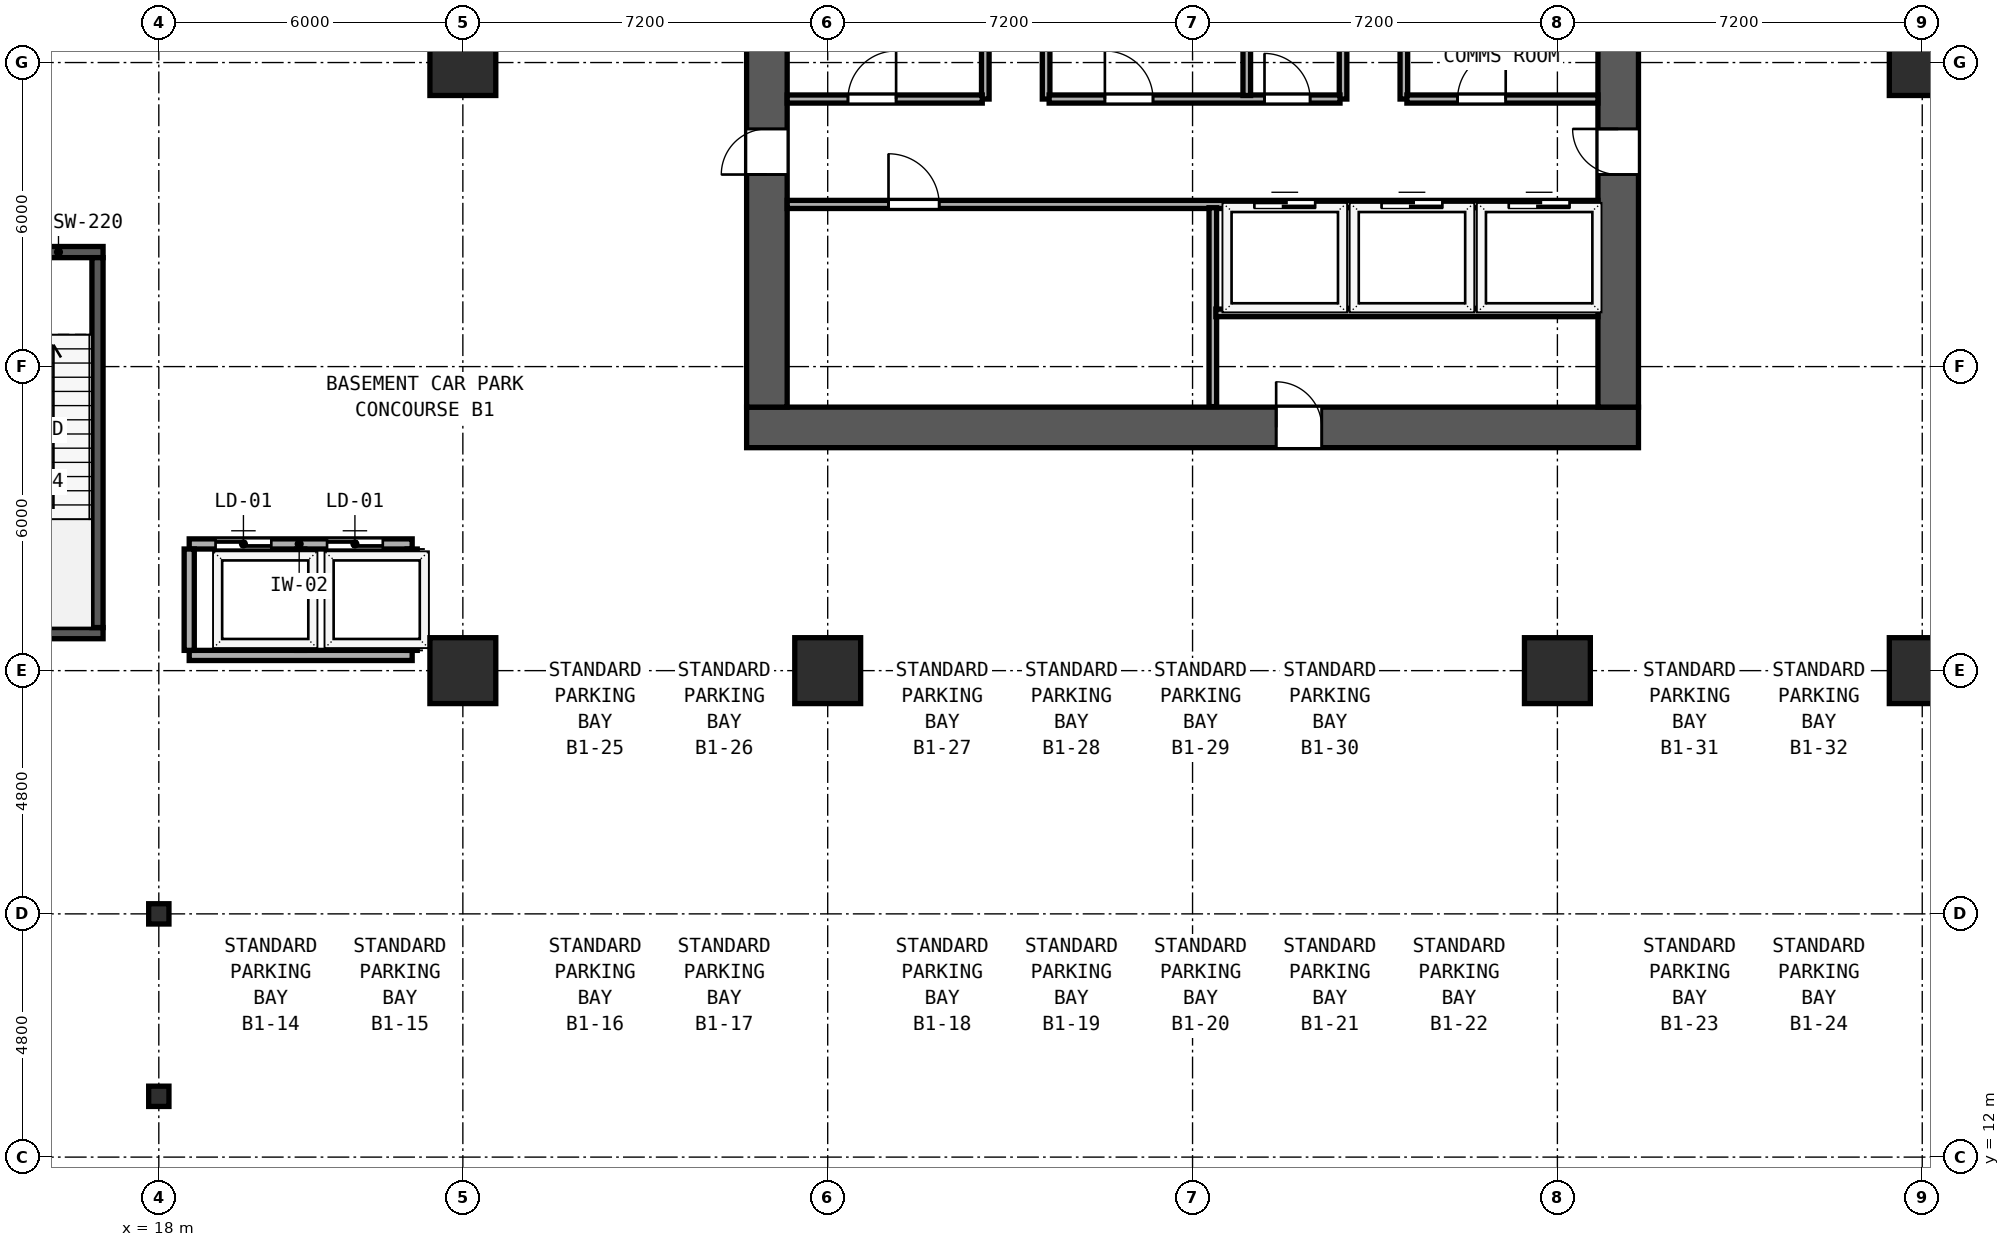
"""IFC4 building model, lengths in metres.
Left out: names, types, materials, properties, quantities, classifications, styles, units other than length and angle.
Written with IfcOpenShell. Run it as: python <this file> out.ifc"""

import sys

from ifc_helpers import new_model, si_unit, direction, frame, frame_2d, origin, origin_2d, place, context, subcontext, project, spatial, rectangle, hollow_rectangle, i_section, extrude, element, fill, save


model = new_model("IFC4")
c1 = context("Model", 3, precision=1e-05, world=origin(), true_north=direction((0.0, 1.0)))
c2 = subcontext(c1, "Body", "Model", "MODEL_VIEW")
j1 = project(units=[si_unit("LENGTHUNIT", "METRE"), si_unit("PLANEANGLEUNIT", "RADIAN")], contexts=[c1])
p1 = place(None, origin())
s1 = spatial("IfcSite", under=j1, at=p1, CompositionType="ELEMENT")
p2 = place(p1, origin())
s2 = spatial("IfcBuilding", under=s1, at=p2, CompositionType="ELEMENT")
p3 = place(p2, frame((0.0, 0.0, -4.8)))
s3 = spatial("IfcBuildingStorey", under=s2, at=p3, CompositionType="ELEMENT", Elevation=-4.8)
p4 = place(p3, frame((29.6, 26.4, 0.0), z_axis=(0.0, 0.0, 1.0), x_axis=(1.0, 0.0, 0.0)))
e1 = element("IfcWall", 1, at=p4, inside=s3, PredefinedType="SHEAR", context=c2, shape_type="SweptSolid", body=[
    extrude(rectangle(XDim=17.6, YDim=0.8, at=frame_2d((8.8, 0.0))), origin(), (0.0, 0.0, 1.0), 4.5),
])
p5 = place(p4, frame((11.35, 0.0, 0.0), z_axis=(0.0, 0.0, 1.0), x_axis=(-1.0, 0.0, 0.0)))
e2 = element("IfcOpeningElement", 2, at=p5, cuts=e1, PredefinedType="OPENING", context=c2, shape_type="SweptSolid", body=[
    extrude(rectangle(XDim=0.9, YDim=2.1, at=frame_2d((0.45, 1.05))), frame((0.0, 0.41, 0.0), z_axis=(0.0, -1.0, 0.0), x_axis=(1.0, 0.0, 0.0)), (0.0, 0.0, 1.0), 0.82),
])
p6 = place(p3, frame((30.0, 26.8, 0.0), z_axis=(0.0, 0.0, 1.0), x_axis=(0.0, 1.0, 0.0)))
e3 = element("IfcWall", 3, at=p6, inside=s3, PredefinedType="SHEAR", context=c2, shape_type="SweptSolid", body=[
    extrude(rectangle(XDim=16.0, YDim=0.8, at=frame_2d((8.0, 0.0))), origin(), (0.0, 0.0, 1.0), 4.5),
])
p7 = place(p6, frame((4.59, 0.0, 0.0)))
e4 = element("IfcOpeningElement", 4, at=p7, cuts=e3, PredefinedType="OPENING", context=c2, shape_type="SweptSolid", body=[
    extrude(rectangle(XDim=0.9, YDim=2.1, at=frame_2d((0.45, 1.05))), frame((0.0, 0.41, 0.0), z_axis=(0.0, -1.0, 0.0), x_axis=(1.0, 0.0, 0.0)), (0.0, 0.0, 1.0), 0.82),
])
p8 = place(p3, frame((46.8, 26.8, 0.0), z_axis=(0.0, 0.0, 1.0), x_axis=(0.0, 1.0, 0.0)))
e5 = element("IfcWall", 5, at=p8, inside=s3, PredefinedType="SHEAR", context=c2, shape_type="SweptSolid", body=[
    extrude(rectangle(XDim=16.0, YDim=0.8, at=frame_2d((8.0, 0.0))), origin(), (0.0, 0.0, 1.0), 4.5),
])
p9 = place(p8, frame((5.49, 0.0, 0.0), z_axis=(0.0, 0.0, 1.0), x_axis=(-1.0, 0.0, 0.0)))
e6 = element("IfcOpeningElement", 6, at=p9, cuts=e5, PredefinedType="OPENING", context=c2, shape_type="SweptSolid", body=[
    extrude(rectangle(XDim=0.9, YDim=2.1, at=frame_2d((0.45, 1.05))), frame((0.0, 0.41, 0.0), z_axis=(0.0, -1.0, 0.0), x_axis=(1.0, 0.0, 0.0)), (0.0, 0.0, 1.0), 0.82),
])
p10 = place(p3, frame((13.28, 29.86, 0.0), z_axis=(0.0, 0.0, 1.0), x_axis=(1.0, 0.0, 0.0)))
e7 = element("IfcWall", 7, at=p10, inside=s3, PredefinedType="SHEAR", context=c2, shape_type="SweptSolid", body=[
    extrude(rectangle(XDim=3.62, YDim=0.22, at=frame_2d((1.81, 0.0))), origin(), (0.0, 0.0, 1.0), 4.5),
])
p11 = place(p10, frame((1.05, 0.0, 0.0)))
e8 = element("IfcOpeningElement", 8, at=p11, cuts=e7, PredefinedType="OPENING", context=c2, shape_type="SweptSolid", body=[
    extrude(rectangle(XDim=1.1, YDim=2.15, at=frame_2d((0.55, 1.075))), frame((0.0, 0.12, 0.0), z_axis=(0.0, -1.0, 0.0), x_axis=(1.0, 0.0, 0.0)), (0.0, 0.0, 1.0), 0.24),
])
p12 = place(p3, frame((13.28, 22.34, 0.0), z_axis=(0.0, 0.0, 1.0), x_axis=(1.0, 0.0, 0.0)))
e9 = element("IfcWall", 9, at=p12, inside=s3, PredefinedType="SHEAR", context=c2, shape_type="SweptSolid", body=[
    extrude(rectangle(XDim=3.62, YDim=0.22, at=frame_2d((1.81, 0.0))), origin(), (0.0, 0.0, 1.0), 4.5),
])
p13 = place(p3, frame((16.79, 22.45, 0.0), z_axis=(0.0, 0.0, 1.0), x_axis=(0.0, 1.0, 0.0)))
e10 = element("IfcWall", 10, at=p13, inside=s3, PredefinedType="SHEAR", context=c2, shape_type="SweptSolid", body=[
    extrude(rectangle(XDim=7.3, YDim=0.22, at=frame_2d((3.65, 0.0))), origin(), (0.0, 0.0, 1.0), 4.5),
])
for number, where, z_axis, x_axis in (
    (11, (24.0, 21.6, 0.0), (0.0, 0.0, 1.0), (1.0, 0.0, 0.0)),
    (12, (24.0, 33.6, 0.0), (0.0, 0.0, 1.0), (1.0, 0.0, 0.0)),
    (13, (52.8, 21.6, 0.0), (0.0, 0.0, 1.0), (1.0, 0.0, 0.0)),
    (14, (52.8, 33.6, 0.0), (0.0, 0.0, 1.0), (1.0, 0.0, 0.0)),
    (15, (31.2, 21.6, 0.0), (0.0, 0.0, 1.0), (1.0, 0.0, 0.0)),
    (16, (45.6, 21.6, 0.0), (0.0, 0.0, 1.0), (1.0, 0.0, 0.0)),
):
    element("IfcColumn", number, at=place(p3, frame(where, z_axis=z_axis, x_axis=x_axis)), inside=s3, PredefinedType="COLUMN", context=c2, shape_type="SweptSolid", body=[
        extrude(hollow_rectangle(XDim=1.3, YDim=1.3, WallThickness=0.048, at=origin_2d()), origin(), (0.0, 0.0, 1.0), 4.8),
    ])
for number, where, z_axis, x_axis in (
    (17, (18.0, 13.2, 0.0), (0.0, 0.0, 1.0), (1.0, 0.0, 0.0)),
    (18, (18.0, 16.8, 0.0), (0.0, 0.0, 1.0), (1.0, 0.0, 0.0)),
):
    element("IfcColumn", number, at=place(p3, frame(where, z_axis=z_axis, x_axis=x_axis)), inside=s3, PredefinedType="COLUMN", context=c2, shape_type="SweptSolid", body=[
        extrude(i_section(OverallWidth=0.4, OverallDepth=0.4, WebThickness=0.013, FlangeThickness=0.021, FilletRadius=0.022, at=origin_2d()), origin(), (0.0, 0.0, 1.0), 4.8),
    ])
for number, where, z_axis, x_axis in (
    (19, (34.31, 32.88, 0.0), (0.0, 0.0, 1.0), (0.0, 1.0, 0.0)),
    (20, (35.51, 32.88, 0.0), (0.0, 0.0, 1.0), (0.0, 1.0, 0.0)),
    (21, (41.37, 32.88, 0.0), (0.0, 0.0, 1.0), (0.0, 1.0, 0.0)),
    (22, (42.57, 32.88, 0.0), (0.0, 0.0, 1.0), (0.0, 1.0, 0.0)),
):
    element("IfcWall", number, at=place(p3, frame(where, z_axis=z_axis, x_axis=x_axis)), inside=s3, PredefinedType="SOLIDWALL", context=c2, shape_type="SweptSolid", body=[
        extrude(rectangle(XDim=2.17, YDim=0.15, at=frame_2d((1.085, 0.0))), origin(), (0.0, 0.0, 1.0), 4.5),
    ])
p14 = place(p3, frame((30.4, 32.88, 0.0), z_axis=(0.0, 0.0, 1.0), x_axis=(1.0, 0.0, 0.0)))
e23 = element("IfcWall", 23, at=p14, inside=s3, PredefinedType="SOLIDWALL", context=c2, shape_type="SweptSolid", body=[
    extrude(rectangle(XDim=3.85, YDim=0.16, at=frame_2d((1.925, 0.0))), origin(), (0.0, 0.0, 1.0), 4.5),
])
p15 = place(p14, frame((2.15, 0.0, 0.0), z_axis=(0.0, 0.0, 1.0), x_axis=(-1.0, 0.0, 0.0)))
e24 = element("IfcOpeningElement", 24, at=p15, cuts=e23, PredefinedType="OPENING", context=c2, shape_type="SweptSolid", body=[
    extrude(rectangle(XDim=0.95, YDim=2.12, at=frame_2d((0.475, 1.06))), frame((0.0, 0.09, 0.0), z_axis=(0.0, -1.0, 0.0), x_axis=(1.0, 0.0, 0.0)), (0.0, 0.0, 1.0), 0.18),
])
p16 = place(p3, frame((35.57, 32.88, 0.0), z_axis=(0.0, 0.0, 1.0), x_axis=(1.0, 0.0, 0.0)))
e25 = element("IfcWall", 25, at=p16, inside=s3, PredefinedType="SOLIDWALL", context=c2, shape_type="SweptSolid", body=[
    extrude(rectangle(XDim=5.74, YDim=0.16, at=frame_2d((2.87, 0.0))), origin(), (0.0, 0.0, 1.0), 4.5),
])
p17 = place(p16, frame((2.05, 0.0, 0.0), z_axis=(0.0, 0.0, 1.0), x_axis=(-1.0, 0.0, 0.0)))
e26 = element("IfcOpeningElement", 26, at=p17, cuts=e25, PredefinedType="OPENING", context=c2, shape_type="SweptSolid", body=[
    extrude(rectangle(XDim=0.95, YDim=2.12, at=frame_2d((0.475, 1.06))), frame((0.0, 0.09, 0.0), z_axis=(0.0, -1.0, 0.0), x_axis=(1.0, 0.0, 0.0)), (0.0, 0.0, 1.0), 0.18),
])
p18 = place(p16, frame((5.15, 0.0, 0.0), z_axis=(0.0, 0.0, 1.0), x_axis=(-1.0, 0.0, 0.0)))
e27 = element("IfcOpeningElement", 27, at=p18, cuts=e25, PredefinedType="OPENING", context=c2, shape_type="SweptSolid", body=[
    extrude(rectangle(XDim=0.9, YDim=2.1, at=frame_2d((0.45, 1.05))), frame((0.0, 0.09, 0.0), z_axis=(0.0, -1.0, 0.0), x_axis=(1.0, 0.0, 0.0)), (0.0, 0.0, 1.0), 0.18),
])
p19 = place(p3, frame((42.63, 32.88, 0.0), z_axis=(0.0, 0.0, 1.0), x_axis=(1.0, 0.0, 0.0)))
e28 = element("IfcWall", 28, at=p19, inside=s3, PredefinedType="SOLIDWALL", context=c2, shape_type="SweptSolid", body=[
    extrude(rectangle(XDim=3.77, YDim=0.16, at=frame_2d((1.885, 0.0))), origin(), (0.0, 0.0, 1.0), 4.5),
])
p20 = place(p19, frame((1.95, 0.0, 0.0), z_axis=(0.0, 0.0, 1.0), x_axis=(-1.0, 0.0, 0.0)))
e29 = element("IfcOpeningElement", 29, at=p20, cuts=e28, PredefinedType="OPENING", context=c2, shape_type="SweptSolid", body=[
    extrude(rectangle(XDim=0.95, YDim=2.12, at=frame_2d((0.475, 1.06))), frame((0.0, 0.09, 0.0), z_axis=(0.0, -1.0, 0.0), x_axis=(1.0, 0.0, 0.0)), (0.0, 0.0, 1.0), 0.18),
])
p21 = place(p3, frame((39.47, 32.95, 0.0), z_axis=(0.0, 0.0, 1.0), x_axis=(0.0, 1.0, 0.0)))
e30 = element("IfcWall", 30, at=p21, inside=s3, PredefinedType="SOLIDWALL", context=c2, shape_type="SweptSolid", body=[
    extrude(rectangle(XDim=2.05, YDim=0.15, at=frame_2d((1.025, 0.0))), origin(), (0.0, 0.0, 1.0), 4.5),
])
p22 = place(p3, frame((30.4, 30.8, 0.0), z_axis=(0.0, 0.0, 1.0), x_axis=(1.0, 0.0, 0.0)))
e31 = element("IfcWall", 31, at=p22, inside=s3, PredefinedType="SOLIDWALL", context=c2, shape_type="SweptSolid", body=[
    extrude(rectangle(XDim=16.0, YDim=0.16, at=frame_2d((8.0, 0.0))), origin(), (0.0, 0.0, 1.0), 4.5),
])
p23 = place(p22, frame((2.0, 0.0, 0.0)))
e32 = element("IfcOpeningElement", 32, at=p23, cuts=e31, PredefinedType="OPENING", context=c2, shape_type="SweptSolid", body=[
    extrude(rectangle(XDim=1.0, YDim=2.1, at=frame_2d((0.5, 1.05))), frame((0.0, 0.09, 0.0), z_axis=(0.0, -1.0, 0.0), x_axis=(1.0, 0.0, 0.0)), (0.0, 0.0, 1.0), 0.18),
])
p24 = place(p22, frame((9.22, 0.0, 0.0)))
e33 = element("IfcOpeningElement", 33, at=p24, cuts=e31, PredefinedType="OPENING", context=c2, shape_type="SweptSolid", body=[
    extrude(rectangle(XDim=1.2, YDim=2.2, at=frame_2d((0.6, 1.1))), frame((0.0, 0.09, 0.0), z_axis=(0.0, -1.0, 0.0), x_axis=(1.0, 0.0, 0.0)), (0.0, 0.0, 1.0), 0.18),
])
p25 = place(p22, frame((11.73, 0.0, 0.0)))
e34 = element("IfcOpeningElement", 34, at=p25, cuts=e31, PredefinedType="OPENING", context=c2, shape_type="SweptSolid", body=[
    extrude(rectangle(XDim=1.2, YDim=2.2, at=frame_2d((0.6, 1.1))), frame((0.0, 0.09, 0.0), z_axis=(0.0, -1.0, 0.0), x_axis=(1.0, 0.0, 0.0)), (0.0, 0.0, 1.0), 0.18),
])
p26 = place(p22, frame((14.24, 0.0, 0.0)))
e35 = element("IfcOpeningElement", 35, at=p26, cuts=e31, PredefinedType="OPENING", context=c2, shape_type="SweptSolid", body=[
    extrude(rectangle(XDim=1.2, YDim=2.2, at=frame_2d((0.6, 1.1))), frame((0.0, 0.09, 0.0), z_axis=(0.0, -1.0, 0.0), x_axis=(1.0, 0.0, 0.0)), (0.0, 0.0, 1.0), 0.18),
])
p27 = place(p3, frame((38.8, 26.81, 0.0), z_axis=(0.0, 0.0, 1.0), x_axis=(0.0, 1.0, 0.0)))
e36 = element("IfcWall", 36, at=p27, inside=s3, PredefinedType="SOLIDWALL", context=c2, shape_type="SweptSolid", body=[
    extrude(rectangle(XDim=3.925, YDim=0.15, at=frame_2d((1.962, 0.0))), origin(), (0.0, 0.0, 1.0), 4.5),
])
p28 = place(p3, frame((38.86, 28.66, 0.0), z_axis=(0.0, 0.0, 1.0), x_axis=(1.0, 0.0, 0.0)))
e37 = element("IfcWall", 37, at=p28, inside=s3, PredefinedType="PARTITIONING", context=c2, shape_type="SweptSolid", body=[
    extrude(rectangle(XDim=7.54, YDim=0.15, at=frame_2d((3.77, 0.0))), origin(), (0.0, 0.0, 1.0), 4.5),
])
for number, where, z_axis, x_axis in (
    (38, (41.47, 28.75, 0.0), (0.0, 0.0, 1.0), (0.0, 1.0, 0.0)),
    (39, (43.98, 28.75, 0.0), (0.0, 0.0, 1.0), (0.0, 1.0, 0.0)),
):
    element("IfcWall", number, at=place(p3, frame(where, z_axis=z_axis, x_axis=x_axis)), inside=s3, PredefinedType="SOLIDWALL", context=c2, shape_type="SweptSolid", body=[
        extrude(rectangle(XDim=1.985, YDim=0.15, at=frame_2d((0.993, 0.0))), origin(), (0.0, 0.0, 1.0), 4.5),
    ])
p29 = place(p3, frame((18.6, 24.1, 0.0), z_axis=(0.0, 0.0, 1.0), x_axis=(1.0, 0.0, 0.0)))
e40 = element("IfcWall", 40, at=p29, inside=s3, PredefinedType="SOLIDWALL", context=c2, shape_type="SweptSolid", body=[
    extrude(rectangle(XDim=4.4, YDim=0.2, at=frame_2d((2.2, 0.0))), origin(), (0.0, 0.0, 1.0), 4.5),
])
p30 = place(p29, frame((0.52, 0.0, 0.0)))
e41 = element("IfcOpeningElement", 41, at=p30, cuts=e40, PredefinedType="OPENING", context=c2, shape_type="SweptSolid", body=[
    extrude(rectangle(XDim=1.1, YDim=2.2, at=frame_2d((0.55, 1.1))), frame((0.0, 0.11, 0.0), z_axis=(0.0, -1.0, 0.0), x_axis=(1.0, 0.0, 0.0)), (0.0, 0.0, 1.0), 0.22),
])
p31 = place(p29, frame((2.72, 0.0, 0.0)))
e42 = element("IfcOpeningElement", 42, at=p31, cuts=e40, PredefinedType="OPENING", context=c2, shape_type="SweptSolid", body=[
    extrude(rectangle(XDim=1.1, YDim=2.2, at=frame_2d((0.55, 1.1))), frame((0.0, 0.11, 0.0), z_axis=(0.0, -1.0, 0.0), x_axis=(1.0, 0.0, 0.0)), (0.0, 0.0, 1.0), 0.22),
])
p32 = place(p3, frame((18.6, 21.9, 0.0), z_axis=(0.0, 0.0, 1.0), x_axis=(1.0, 0.0, 0.0)))
e43 = element("IfcWall", 43, at=p32, inside=s3, PredefinedType="SOLIDWALL", context=c2, shape_type="SweptSolid", body=[
    extrude(rectangle(XDim=4.4, YDim=0.2, at=frame_2d((2.2, 0.0))), origin(), (0.0, 0.0, 1.0), 4.5),
])
for number, where, z_axis, x_axis in (
    (44, (18.6, 22.0, 0.0), (0.0, 0.0, 1.0), (0.0, 1.0, 0.0)),
    (45, (23.0, 22.0, 0.0), (0.0, 0.0, 1.0), (0.0, 1.0, 0.0)),
):
    element("IfcWall", number, at=place(p3, frame(where, z_axis=z_axis, x_axis=x_axis)), inside=s3, PredefinedType="SOLIDWALL", context=c2, shape_type="SweptSolid", body=[
        extrude(rectangle(XDim=2.0, YDim=0.2, at=frame_2d((1.0, 0.0))), origin(), (0.0, 0.0, 1.0), 4.5),
    ])
p33 = place(p3, frame((20.8, 22.0, 0.0), z_axis=(0.0, 0.0, 1.0), x_axis=(0.0, 1.0, 0.0)))
e46 = element("IfcWall", 46, at=p33, inside=s3, PredefinedType="SOLIDWALL", context=c2, shape_type="SweptSolid", body=[
    extrude(rectangle(XDim=2.0, YDim=0.16, at=frame_2d((1.0, 0.0))), origin(), (0.0, 0.0, 1.0), 4.5),
])
p34 = place(p7, origin())
e47 = element("IfcDoor", 47, at=p34, inside=s3, OperationType="SINGLE_SWING_LEFT", PredefinedType="DOOR", context=c2, shape_type="SweptSolid", body=[
    extrude(rectangle(XDim=0.9, YDim=2.1, at=frame_2d((0.45, 1.05))), frame((0.0, 0.025, 0.0), z_axis=(0.0, -1.0, 0.0), x_axis=(1.0, 0.0, 0.0)), (0.0, 0.0, 1.0), 0.05),
])
fill(e4, e47)
p35 = place(p9, origin())
e48 = element("IfcDoor", 48, at=p35, inside=s3, OperationType="SINGLE_SWING_LEFT", PredefinedType="DOOR", context=c2, shape_type="SweptSolid", body=[
    extrude(rectangle(XDim=0.9, YDim=2.1, at=frame_2d((0.45, 1.05))), frame((0.0, 0.025, 0.0), z_axis=(0.0, -1.0, 0.0), x_axis=(1.0, 0.0, 0.0)), (0.0, 0.0, 1.0), 0.05),
])
fill(e6, e48)
p36 = place(p15, origin())
e49 = element("IfcDoor", 49, at=p36, inside=s3, OperationType="SINGLE_SWING_LEFT", PredefinedType="DOOR", context=c2, shape_type="SweptSolid", body=[
    extrude(rectangle(XDim=0.95, YDim=2.12, at=frame_2d((0.475, 1.06))), frame((0.0, 0.025, 0.0), z_axis=(0.0, -1.0, 0.0), x_axis=(1.0, 0.0, 0.0)), (0.0, 0.0, 1.0), 0.05),
])
fill(e24, e49)
p37 = place(p17, origin())
e50 = element("IfcDoor", 50, at=p37, inside=s3, OperationType="SINGLE_SWING_RIGHT", PredefinedType="DOOR", context=c2, shape_type="SweptSolid", body=[
    extrude(rectangle(XDim=0.95, YDim=2.12, at=frame_2d((0.475, 1.06))), frame((0.0, 0.025, 0.0), z_axis=(0.0, -1.0, 0.0), x_axis=(1.0, 0.0, 0.0)), (0.0, 0.0, 1.0), 0.05),
])
fill(e26, e50)
p38 = place(p18, origin())
e51 = element("IfcDoor", 51, at=p38, inside=s3, OperationType="SINGLE_SWING_RIGHT", PredefinedType="DOOR", context=c2, shape_type="SweptSolid", body=[
    extrude(rectangle(XDim=0.9, YDim=2.1, at=frame_2d((0.45, 1.05))), frame((0.0, 0.025, 0.0), z_axis=(0.0, -1.0, 0.0), x_axis=(1.0, 0.0, 0.0)), (0.0, 0.0, 1.0), 0.05),
])
fill(e27, e51)
p39 = place(p20, origin())
e52 = element("IfcDoor", 52, at=p39, inside=s3, OperationType="SINGLE_SWING_LEFT", PredefinedType="DOOR", context=c2, shape_type="SweptSolid", body=[
    extrude(rectangle(XDim=0.95, YDim=2.12, at=frame_2d((0.475, 1.06))), frame((0.0, 0.025, 0.0), z_axis=(0.0, -1.0, 0.0), x_axis=(1.0, 0.0, 0.0)), (0.0, 0.0, 1.0), 0.05),
])
fill(e29, e52)
p40 = place(p23, origin())
e53 = element("IfcDoor", 53, at=p40, inside=s3, OperationType="SINGLE_SWING_LEFT", PredefinedType="DOOR", context=c2, shape_type="SweptSolid", body=[
    extrude(rectangle(XDim=1.0, YDim=2.1, at=frame_2d((0.5, 1.05))), frame((0.0, 0.025, 0.0), z_axis=(0.0, -1.0, 0.0), x_axis=(1.0, 0.0, 0.0)), (0.0, 0.0, 1.0), 0.05),
])
fill(e32, e53)
p41 = place(p5, origin())
e54 = element("IfcDoor", 54, at=p41, inside=s3, OperationType="SINGLE_SWING_RIGHT", PredefinedType="DOOR", context=c2, shape_type="SweptSolid", body=[
    extrude(rectangle(XDim=0.9, YDim=2.1, at=frame_2d((0.45, 1.05))), frame((0.0, -0.195, 0.0), z_axis=(0.0, -1.0, 0.0), x_axis=(1.0, 0.0, 0.0)), (0.0, 0.0, 1.0), 0.05),
])
fill(e2, e54)
p42 = place(p24, origin())
e55 = element("IfcDoor", 55, at=p42, inside=s3, OperationType="SLIDING_TO_RIGHT", PredefinedType="DOOR", context=c2, shape_type="SweptSolid", body=[
    extrude(rectangle(XDim=1.2, YDim=2.2, at=frame_2d((0.6, 1.1))), frame((0.0, 0.025, 0.0), z_axis=(0.0, -1.0, 0.0), x_axis=(1.0, 0.0, 0.0)), (0.0, 0.0, 1.0), 0.05),
])
fill(e33, e55)
p43 = place(p25, origin())
e56 = element("IfcDoor", 56, at=p43, inside=s3, OperationType="SLIDING_TO_RIGHT", PredefinedType="DOOR", context=c2, shape_type="SweptSolid", body=[
    extrude(rectangle(XDim=1.2, YDim=2.2, at=frame_2d((0.6, 1.1))), frame((0.0, 0.025, 0.0), z_axis=(0.0, -1.0, 0.0), x_axis=(1.0, 0.0, 0.0)), (0.0, 0.0, 1.0), 0.05),
])
fill(e34, e56)
p44 = place(p26, origin())
e57 = element("IfcDoor", 57, at=p44, inside=s3, OperationType="SLIDING_TO_RIGHT", PredefinedType="DOOR", context=c2, shape_type="SweptSolid", body=[
    extrude(rectangle(XDim=1.2, YDim=2.2, at=frame_2d((0.6, 1.1))), frame((0.0, 0.025, 0.0), z_axis=(0.0, -1.0, 0.0), x_axis=(1.0, 0.0, 0.0)), (0.0, 0.0, 1.0), 0.05),
])
fill(e35, e57)
p45 = place(p30, origin())
e58 = element("IfcDoor", 58, at=p45, inside=s3, OperationType="SLIDING_TO_LEFT", PredefinedType="DOOR", context=c2, shape_type="SweptSolid", body=[
    extrude(rectangle(XDim=1.1, YDim=2.2, at=frame_2d((0.55, 1.1))), frame((0.0, 0.025, 0.0), z_axis=(0.0, -1.0, 0.0), x_axis=(1.0, 0.0, 0.0)), (0.0, 0.0, 1.0), 0.05),
])
fill(e41, e58)
p46 = place(p31, origin())
e59 = element("IfcDoor", 59, at=p46, inside=s3, OperationType="SLIDING_TO_LEFT", PredefinedType="DOOR", context=c2, shape_type="SweptSolid", body=[
    extrude(rectangle(XDim=1.1, YDim=2.2, at=frame_2d((0.55, 1.1))), frame((0.0, 0.025, 0.0), z_axis=(0.0, -1.0, 0.0), x_axis=(1.0, 0.0, 0.0)), (0.0, 0.0, 1.0), 0.05),
])
fill(e42, e59)
save(model, sys.argv[1])
